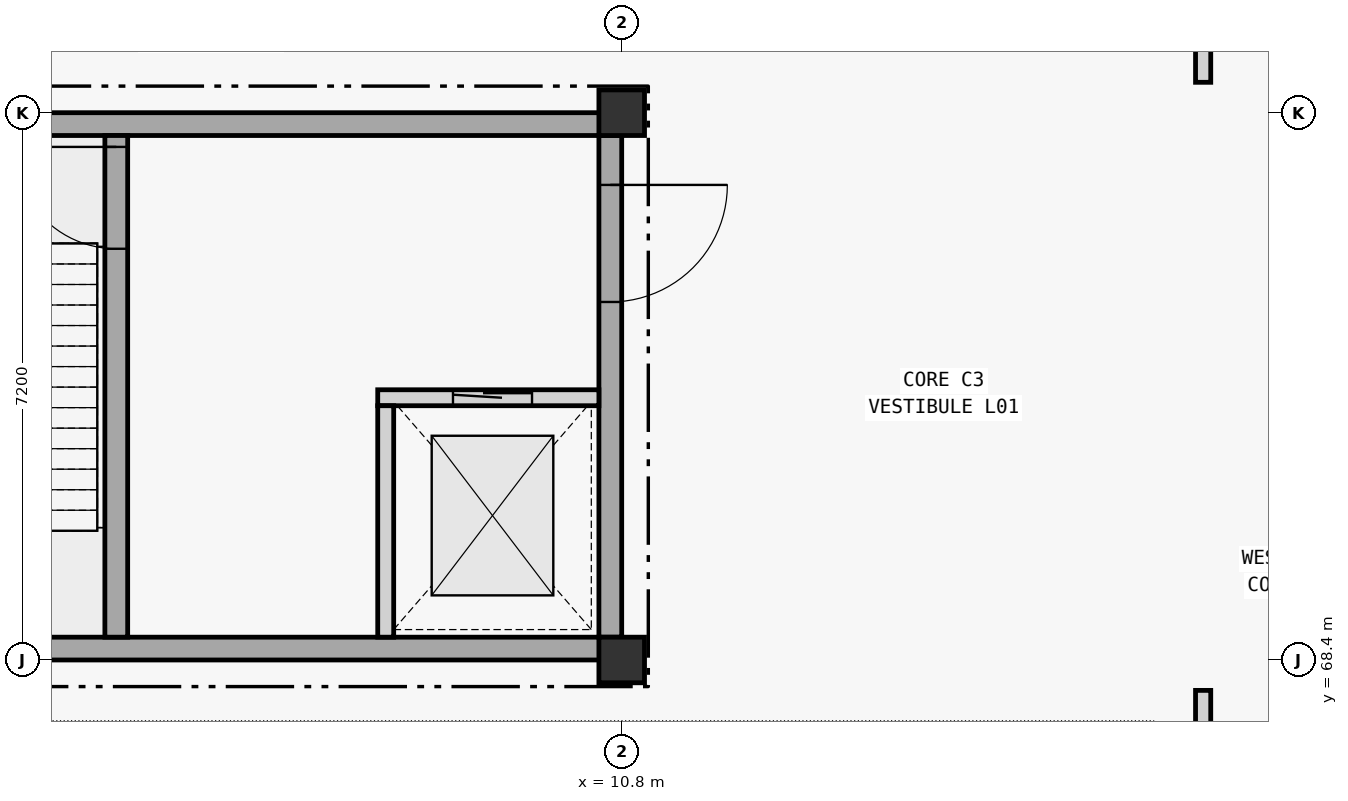
"""IFC4 building model, lengths in metres.
Left out: names, types, materials, properties, quantities, classifications, styles, units other than length and angle.
Written with IfcOpenShell. Run it as: python <this file> out.ifc"""

import sys

from ifc_helpers import new_model, si_unit, direction, frame, frame_2d, origin, origin_2d, place, context, subcontext, project, spatial, rectangle, extrude, element, fill, save


model = new_model("IFC4")
c1 = context("Model", 3, precision=1e-05, world=origin(), true_north=direction((0.0, 1.0)))
c2 = subcontext(c1, "Body", "Model", "MODEL_VIEW")
j1 = project(units=[si_unit("LENGTHUNIT", "METRE"), si_unit("PLANEANGLEUNIT", "RADIAN")], contexts=[c1])
p1 = place(None, origin())
s1 = spatial("IfcSite", under=j1, at=p1, CompositionType="ELEMENT")
p2 = place(p1, origin())
s2 = spatial("IfcBuilding", under=s1, at=p2, CompositionType="ELEMENT")
p3 = place(p2, frame((0.0, 0.0, 5.4)))
s3 = spatial("IfcBuildingStorey", under=s2, at=p3, CompositionType="ELEMENT", Elevation=5.4)
for number, where, z_axis, x_axis in (
    (1, (10.8, 68.4, 0.0), (0.0, 0.0, 1.0), (1.0, 0.0, 0.0)),
    (2, (10.8, 75.6, 0.0), (0.0, 0.0, 1.0), (1.0, 0.0, 0.0)),
):
    element("IfcColumn", number, at=place(p3, frame(where, z_axis=z_axis, x_axis=x_axis)), inside=s3, PredefinedType="COLUMN", context=c2, shape_type="SweptSolid", body=[
        extrude(rectangle(XDim=0.6, YDim=0.6, at=origin_2d()), origin(), (0.0, 0.0, 1.0), 5.4),
    ])
for number, where, z_axis, x_axis in (
    (3, (10.8, 68.55, 0.0), (0.0, 0.0, 1.0), (-1.0, 0.0, 0.0)),
    (4, (0.0, 75.45, 0.0), (0.0, 0.0, 1.0), (1.0, 0.0, 0.0)),
):
    element("IfcWall", number, at=place(p3, frame(where, z_axis=z_axis, x_axis=x_axis)), inside=s3, PredefinedType="SHEAR", context=c2, shape_type="SweptSolid", body=[
        extrude(rectangle(XDim=10.8, YDim=0.3, at=frame_2d((5.4, 0.0))), origin(), (0.0, 0.0, 1.0), 5.4),
    ])
p4 = place(p3, frame((10.65, 75.3, 0.0), z_axis=(0.0, 0.0, 1.0), x_axis=(0.0, -1.0, 0.0)))
e5 = element("IfcWall", 5, at=p4, inside=s3, PredefinedType="SHEAR", context=c2, shape_type="SweptSolid", body=[
    extrude(rectangle(XDim=6.6, YDim=0.3, at=frame_2d((3.3, 0.0))), origin(), (0.0, 0.0, 1.0), 5.4),
])
p5 = place(p4, frame((0.65, 0.0, 0.0)))
e6 = element("IfcOpeningElement", 6, at=p5, cuts=e5, PredefinedType="OPENING", context=c2, shape_type="SweptSolid", body=[
    extrude(rectangle(XDim=1.54, YDim=2.22, at=frame_2d((0.77, 1.11))), frame((0.0, 0.15, 0.0), z_axis=(0.0, -1.0, 0.0), x_axis=(1.0, 0.0, 0.0)), (0.0, 0.0, 1.0), 0.3),
])
p6 = place(p3, frame((4.15, 68.7, 0.0), z_axis=(0.0, 0.0, 1.0), x_axis=(0.0, 1.0, 0.0)))
e7 = element("IfcWall", 7, at=p6, inside=s3, PredefinedType="SHEAR", context=c2, shape_type="SweptSolid", body=[
    extrude(rectangle(XDim=6.6, YDim=0.3, at=frame_2d((3.3, 0.0))), origin(), (0.0, 0.0, 1.0), 5.4),
])
p7 = place(p6, frame((5.11, 0.0, 0.0)))
e8 = element("IfcOpeningElement", 8, at=p7, cuts=e7, PredefinedType="OPENING", context=c2, shape_type="SweptSolid", body=[
    extrude(rectangle(XDim=1.34, YDim=2.18, at=frame_2d((0.67, 1.09))), frame((0.0, 0.15, 0.0), z_axis=(0.0, -1.0, 0.0), x_axis=(1.0, 0.0, 0.0)), (0.0, 0.0, 1.0), 0.3),
])
p8 = place(p3, frame((7.59, 71.85, 0.0), z_axis=(0.0, 0.0, 1.0), x_axis=(1.0, 0.0, 0.0)))
e9 = element("IfcWall", 9, at=p8, inside=s3, PredefinedType="STANDARD", context=c2, shape_type="SweptSolid", body=[
    extrude(rectangle(XDim=2.91, YDim=0.21, at=frame_2d((1.455, 0.0))), origin(), (0.0, 0.0, 1.0), 5.4),
])
p9 = place(p8, frame((0.99, 0.0, 0.0)))
e10 = element("IfcOpeningElement", 10, at=p9, cuts=e9, PredefinedType="OPENING", context=c2, shape_type="SweptSolid", body=[
    extrude(rectangle(XDim=1.04, YDim=2.16, at=frame_2d((0.52, 1.08))), frame((0.0, 0.105, 0.0), z_axis=(0.0, -1.0, 0.0), x_axis=(1.0, 0.0, 0.0)), (0.0, 0.0, 1.0), 0.21),
])
p10 = place(p3, frame((7.695, 68.7, 0.0), z_axis=(0.0, 0.0, 1.0), x_axis=(0.0, 1.0, 0.0)))
e11 = element("IfcWall", 11, at=p10, inside=s3, PredefinedType="STANDARD", context=c2, shape_type="SweptSolid", body=[
    extrude(rectangle(XDim=3.045, YDim=0.21, at=frame_2d((1.522, 0.0))), origin(), (0.0, 0.0, 1.0), 5.4),
])
p11 = place(p3, frame((18.45, 47.3, 0.0), z_axis=(0.0, 0.0, 1.0), x_axis=(0.0, 1.0, 0.0)))
e12 = element("IfcWall", 12, at=p11, inside=s3, PredefinedType="STANDARD", context=c2, shape_type="SweptSolid", body=[
    extrude(rectangle(XDim=20.7, YDim=0.2, at=frame_2d((10.35, 0.0))), origin(), (0.0, 0.0, 1.0), 4.22),
])
p12 = place(p11, frame((9.52, 0.0, 0.0)))
e13 = element("IfcOpeningElement", 13, at=p12, cuts=e12, PredefinedType="OPENING", context=c2, shape_type="SweptSolid", body=[
    extrude(rectangle(XDim=1.66, YDim=2.32, at=frame_2d((0.83, 1.16))), frame((0.0, 0.1, 0.0), z_axis=(0.0, -1.0, 0.0), x_axis=(1.0, 0.0, 0.0)), (0.0, 0.0, 1.0), 0.2),
])
p13 = place(p3, frame((18.45, 76.0, 0.0), z_axis=(0.0, 0.0, 1.0), x_axis=(0.0, 1.0, 0.0)))
e14 = element("IfcWall", 14, at=p13, inside=s3, PredefinedType="STANDARD", context=c2, shape_type="SweptSolid", body=[
    extrude(rectangle(XDim=20.8, YDim=0.2, at=frame_2d((10.4, 0.0))), origin(), (0.0, 0.0, 1.0), 4.22),
])
p14 = place(p13, frame((9.58, 0.0, 0.0)))
e15 = element("IfcOpeningElement", 15, at=p14, cuts=e14, PredefinedType="OPENING", context=c2, shape_type="SweptSolid", body=[
    extrude(rectangle(XDim=1.64, YDim=2.28, at=frame_2d((0.82, 1.14))), frame((0.0, 0.1, 0.0), z_axis=(0.0, -1.0, 0.0), x_axis=(1.0, 0.0, 0.0)), (0.0, 0.0, 1.0), 0.2),
])
p15 = place(p9, origin())
e16 = element("IfcDoor", 16, at=p15, inside=s3, OperationType="SLIDING_TO_LEFT", PredefinedType="DOOR", context=c2, shape_type="SweptSolid", body=[
    extrude(rectangle(XDim=1.04, YDim=2.16, at=frame_2d((0.52, 1.08))), frame((0.0, 0.025, 0.0), z_axis=(0.0, -1.0, 0.0), x_axis=(1.0, 0.0, 0.0)), (0.0, 0.0, 1.0), 0.05),
])
fill(e10, e16)
p16 = place(p7, origin())
e17 = element("IfcDoor", 17, at=p16, inside=s3, OperationType="SINGLE_SWING_RIGHT", PredefinedType="DOOR", context=c2, shape_type="SweptSolid", body=[
    extrude(rectangle(XDim=1.34, YDim=2.18, at=frame_2d((0.67, 1.09))), frame((0.0, 0.025, 0.0), z_axis=(0.0, -1.0, 0.0), x_axis=(1.0, 0.0, 0.0)), (0.0, 0.0, 1.0), 0.05),
])
fill(e8, e17)
p17 = place(p5, origin())
e18 = element("IfcDoor", 18, at=p17, inside=s3, OperationType="SINGLE_SWING_LEFT", PredefinedType="DOOR", context=c2, shape_type="SweptSolid", body=[
    extrude(rectangle(XDim=1.54, YDim=2.22, at=frame_2d((0.77, 1.11))), frame((0.0, 0.025, 0.0), z_axis=(0.0, -1.0, 0.0), x_axis=(1.0, 0.0, 0.0)), (0.0, 0.0, 1.0), 0.05),
])
fill(e6, e18)
save(model, sys.argv[1])
